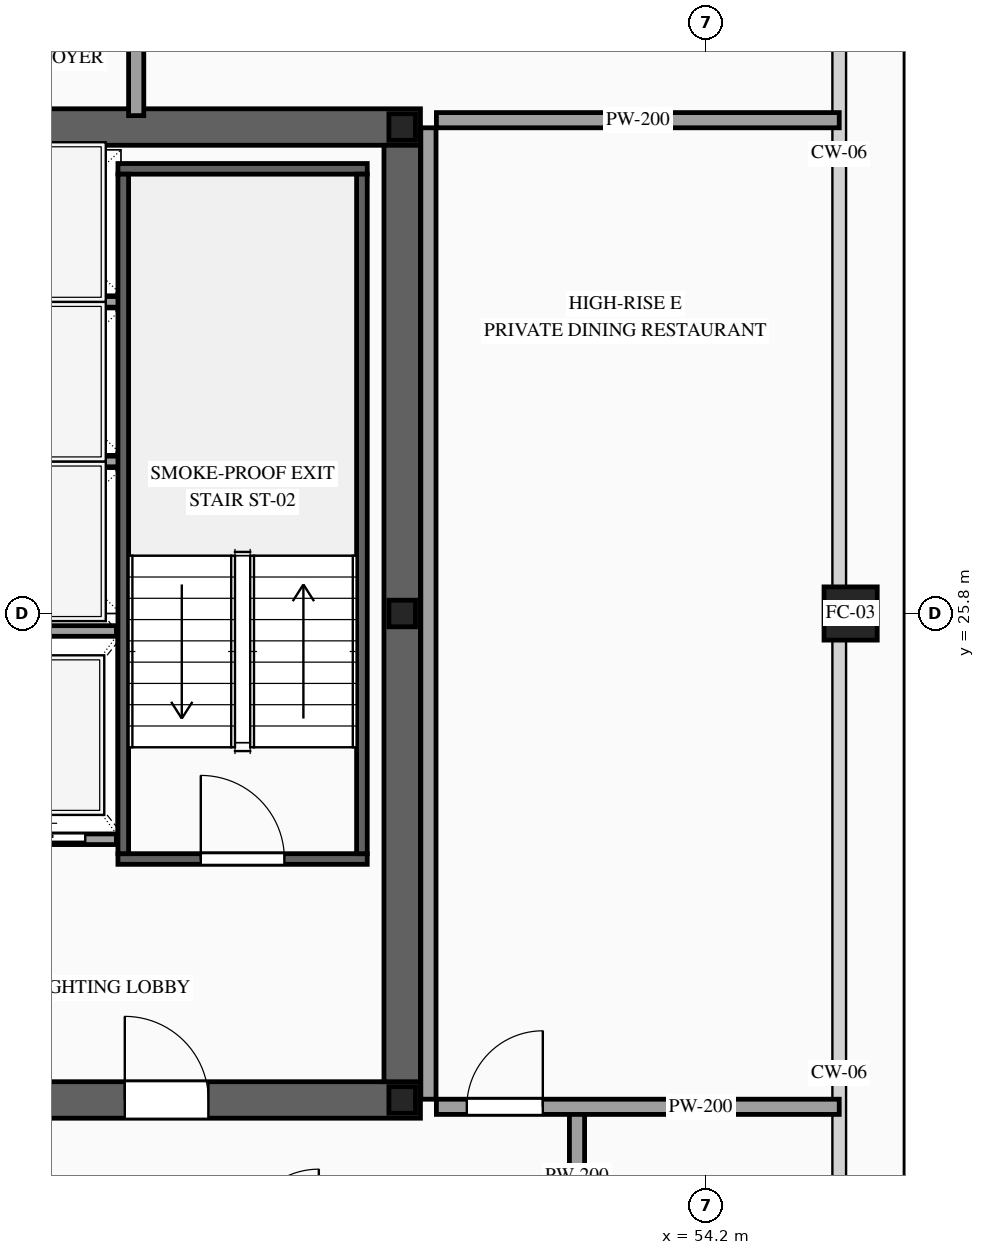
"""IFC4 building model, lengths in metres.
Left out: names, types, materials, properties, quantities, classifications, styles, units other than length and angle.
Written with IfcOpenShell. Run it as: python <this file> out.ifc"""

import sys

from ifc_helpers import new_model, si_unit, direction, frame, frame_2d, origin, origin_2d, place, context, subcontext, project, spatial, rectangle, hollow_rectangle, i_section, extrude, source, transform, mapped, element, fill, save


model = new_model("IFC4")
c1 = context("Model", 3, precision=1e-05, world=origin(), true_north=direction((0.0, 1.0)))
c2 = subcontext(c1, "Body", "Model", "MODEL_VIEW")
j1 = project(units=[si_unit("LENGTHUNIT", "METRE"), si_unit("PLANEANGLEUNIT", "RADIAN")], contexts=[c1])
p1 = place(None, origin())
s1 = spatial("IfcSite", under=j1, at=p1, CompositionType="ELEMENT")
p2 = place(p1, origin())
s2 = spatial("IfcBuilding", under=s1, at=p2, CompositionType="ELEMENT")
p3 = place(p2, frame((0.0, 0.0, 332.2)))
s3 = spatial("IfcBuildingStorey", under=s2, at=p3, CompositionType="ELEMENT", Elevation=332.2)
p4 = place(p3, frame((23.56, 19.4, 0.0), z_axis=(0.0, 0.0, 1.0), x_axis=(1.0, 0.0, 0.0)))
e1 = element("IfcWall", 1, at=p4, inside=s3, PredefinedType="SHEAR", context=c2, shape_type="SweptSolid", body=[
    extrude(rectangle(XDim=26.88, YDim=0.48, at=frame_2d((13.44, 0.0))), origin(), (0.0, 0.0, 1.0), 3.5),
])
p5 = place(p4, frame((1.89, 0.0, 0.0)))
e2 = element("IfcOpeningElement", 2, at=p5, cuts=e1, PredefinedType="OPENING", context=c2, shape_type="SweptSolid", body=[
    extrude(rectangle(XDim=1.1, YDim=2.2, at=frame_2d((0.55, 1.1))), frame((0.0, 0.255, 0.0), z_axis=(0.0, -1.0, 0.0), x_axis=(1.0, 0.0, 0.0)), (0.0, 0.0, 1.0), 0.51),
])
p6 = place(p4, frame((9.79, 0.0, 0.0)))
e3 = element("IfcOpeningElement", 3, at=p6, cuts=e1, PredefinedType="OPENING", context=c2, shape_type="SweptSolid", body=[
    extrude(rectangle(XDim=1.1, YDim=2.2, at=frame_2d((0.55, 1.1))), frame((0.0, 0.255, 0.0), z_axis=(0.0, -1.0, 0.0), x_axis=(1.0, 0.0, 0.0)), (0.0, 0.0, 1.0), 0.51),
])
p7 = place(p4, frame((22.99, 0.0, 0.0)))
e4 = element("IfcOpeningElement", 4, at=p7, cuts=e1, PredefinedType="OPENING", context=c2, shape_type="SweptSolid", body=[
    extrude(rectangle(XDim=1.1, YDim=2.2, at=frame_2d((0.55, 1.1))), frame((0.0, 0.255, 0.0), z_axis=(0.0, -1.0, 0.0), x_axis=(1.0, 0.0, 0.0)), (0.0, 0.0, 1.0), 0.51),
])
p8 = place(p4, frame((19.61, 0.0, 0.0)))
e5 = element("IfcOpeningElement", 5, at=p8, cuts=e1, PredefinedType="OPENING", context=c2, shape_type="SweptSolid", body=[
    extrude(rectangle(XDim=0.9, YDim=2.15, at=frame_2d((0.45, 1.075))), frame((0.0, 0.255, 0.0), z_axis=(0.0, -1.0, 0.0), x_axis=(1.0, 0.0, 0.0)), (0.0, 0.0, 1.0), 0.51),
])
p9 = place(p4, frame((18.17, 0.0, 0.0)))
e6 = element("IfcOpeningElement", 6, at=p9, cuts=e1, PredefinedType="OPENING", context=c2, shape_type="SweptSolid", body=[
    extrude(rectangle(XDim=0.9, YDim=2.15, at=frame_2d((0.45, 1.075))), frame((0.0, 0.255, 0.0), z_axis=(0.0, -1.0, 0.0), x_axis=(1.0, 0.0, 0.0)), (0.0, 0.0, 1.0), 0.51),
])
p10 = place(p3, frame((23.56, 32.2, 0.0), z_axis=(0.0, 0.0, 1.0), x_axis=(1.0, 0.0, 0.0)))
e7 = element("IfcWall", 7, at=p10, inside=s3, PredefinedType="SHEAR", context=c2, shape_type="SweptSolid", body=[
    extrude(rectangle(XDim=26.88, YDim=0.48, at=frame_2d((13.44, 0.0))), origin(), (0.0, 0.0, 1.0), 3.5),
])
p11 = place(p10, frame((4.51, 0.0, 0.0)))
e8 = element("IfcOpeningElement", 8, at=p11, cuts=e7, PredefinedType="OPENING", context=c2, shape_type="SweptSolid", body=[
    extrude(rectangle(XDim=0.9, YDim=2.15, at=frame_2d((0.45, 1.075))), frame((0.0, 0.255, 0.0), z_axis=(0.0, -1.0, 0.0), x_axis=(1.0, 0.0, 0.0)), (0.0, 0.0, 1.0), 0.51),
])
p12 = place(p10, frame((9.79, 0.0, 0.0)))
e9 = element("IfcOpeningElement", 9, at=p12, cuts=e7, PredefinedType="OPENING", context=c2, shape_type="SweptSolid", body=[
    extrude(rectangle(XDim=1.1, YDim=2.2, at=frame_2d((0.55, 1.1))), frame((0.0, 0.255, 0.0), z_axis=(0.0, -1.0, 0.0), x_axis=(1.0, 0.0, 0.0)), (0.0, 0.0, 1.0), 0.51),
])
p13 = place(p10, frame((15.64, 0.0, 0.0)))
e10 = element("IfcOpeningElement", 10, at=p13, cuts=e7, PredefinedType="OPENING", context=c2, shape_type="SweptSolid", body=[
    extrude(rectangle(XDim=1.1, YDim=2.2, at=frame_2d((0.55, 1.1))), frame((0.0, 0.255, 0.0), z_axis=(0.0, -1.0, 0.0), x_axis=(1.0, 0.0, 0.0)), (0.0, 0.0, 1.0), 0.51),
])
p14 = place(p10, frame((18.74, 0.0, 0.0)))
e11 = element("IfcOpeningElement", 11, at=p14, cuts=e7, PredefinedType="OPENING", context=c2, shape_type="SweptSolid", body=[
    extrude(rectangle(XDim=1.1, YDim=2.2, at=frame_2d((0.55, 1.1))), frame((0.0, 0.255, 0.0), z_axis=(0.0, -1.0, 0.0), x_axis=(1.0, 0.0, 0.0)), (0.0, 0.0, 1.0), 0.51),
])
m1 = source(origin(), c2, "Body", "SweptSolid", [
    extrude(rectangle(XDim=12.32, YDim=0.48, at=frame_2d((6.16, 0.0))), origin(), (0.0, 0.0, 1.0), 3.5),
])
p15 = place(p3, frame((50.2, 19.64, 0.0), z_axis=(0.0, 0.0, 1.0), x_axis=(0.0, 1.0, 0.0)))
e12 = element("IfcWall", 12, at=p15, inside=s3, PredefinedType="SHEAR", context=c2, shape_type="MappedRepresentation", body=[
    mapped(m1, transform((0.0, 0.0, 0.0), scale=1.0)),
])
m2 = source(origin(), c2, "Body", "SweptSolid", [
    extrude(i_section(OverallWidth=0.35, OverallDepth=0.35, WebThickness=0.012, FlangeThickness=0.019, at=origin_2d()), origin(), (0.0, 0.0, 1.0), 3.5),
])
for number, where, z_axis, x_axis in (
    (13, (50.2, 19.4, 0.0), (0.0, 0.0, 1.0), (1.0, 0.0, 0.0)),
    (14, (50.2, 25.8, 0.0), (0.0, 0.0, 1.0), (1.0, 0.0, 0.0)),
    (15, (50.2, 32.2, 0.0), (0.0, 0.0, 1.0), (1.0, 0.0, 0.0)),
):
    element("IfcColumn", number, at=place(p3, frame(where, z_axis=z_axis, x_axis=x_axis)), inside=s3, PredefinedType="COLUMN", context=c2, shape_type="MappedRepresentation", body=[
        mapped(m2, transform((0.0, 0.0, 0.0), scale=1.0)),
    ])
m3 = source(origin(), c2, "Body", "SweptSolid", [
    extrude(hollow_rectangle(XDim=0.7, YDim=0.7, WallThickness=0.032, at=origin_2d()), origin(), (0.0, 0.0, 1.0), 3.5),
])
p16 = place(p3, frame((56.1, 25.8, 0.0), z_axis=(0.0, 0.0, 1.0), x_axis=(1.0, 0.0, 0.0)))
e16 = element("IfcColumn", 16, at=p16, inside=s3, PredefinedType="COLUMN", context=c2, shape_type="MappedRepresentation", body=[
    mapped(m3, transform((0.0, 0.0, 0.0), scale=1.0)),
])
p17 = place(p3, frame((44.52, 22.83, 0.0), z_axis=(0.0, 0.0, 1.0), x_axis=(1.0, 0.0, 0.0)))
e17 = element("IfcWall", 17, at=p17, inside=s3, PredefinedType="SOLIDWALL", context=c2, shape_type="SweptSolid", body=[
    extrude(rectangle(XDim=1.92, YDim=0.14, at=frame_2d((0.96, 0.0))), origin(), (0.0, 0.0, 1.0), 3.28),
])
p18 = place(p17, frame((0.41, 0.0, 0.0)))
e18 = element("IfcOpeningElement", 18, at=p18, cuts=e17, PredefinedType="OPENING", context=c2, shape_type="SweptSolid", body=[
    extrude(rectangle(XDim=1.1, YDim=2.2, at=frame_2d((0.55, 1.1))), frame((0.0, 0.085, 0.0), z_axis=(0.0, -1.0, 0.0), x_axis=(1.0, 0.0, 0.0)), (0.0, 0.0, 1.0), 0.17),
])
m4 = source(origin(), c2, "Body", "SweptSolid", [
    extrude(rectangle(XDim=1.92, YDim=0.14, at=frame_2d((0.96, 0.0))), origin(), (0.0, 0.0, 1.0), 3.28),
])
p19 = place(p3, frame((44.52, 25.57, 0.0), z_axis=(0.0, 0.0, 1.0), x_axis=(1.0, 0.0, 0.0)))
e19 = element("IfcWall", 19, at=p19, inside=s3, PredefinedType="SOLIDWALL", context=c2, shape_type="MappedRepresentation", body=[
    mapped(m4, transform((0.0, 0.0, 0.0), scale=1.0)),
])
m5 = source(origin(), c2, "Body", "SweptSolid", [
    extrude(rectangle(XDim=2.0, YDim=0.14, at=frame_2d((1.0, 0.0))), origin(), (0.0, 0.0, 1.0), 3.28),
])
for number, where, z_axis, x_axis in (
    (20, (44.5, 27.8, 0.0), (0.0, 0.0, 1.0), (1.0, 0.0, 0.0)),
    (21, (44.5, 29.9, 0.0), (0.0, 0.0, 1.0), (1.0, 0.0, 0.0)),
):
    element("IfcWall", number, at=place(p3, frame(where, z_axis=z_axis, x_axis=x_axis)), inside=s3, PredefinedType="SOLIDWALL", context=c2, shape_type="MappedRepresentation", body=[
        mapped(m5, transform((0.0, 0.0, 0.0), scale=1.0)),
    ])
p20 = place(p3, frame((46.46, 22.57, 0.0), z_axis=(0.0, 0.0, 1.0), x_axis=(1.0, 0.0, 0.0)))
e22 = element("IfcWall", 22, at=p20, inside=s3, PredefinedType="SOLIDWALL", context=c2, shape_type="SweptSolid", body=[
    extrude(rectangle(XDim=3.28, YDim=0.14, at=frame_2d((1.64, 0.0))), origin(), (0.0, 0.0, 1.0), 3.28),
])
p21 = place(p20, frame((1.09, 0.0, 0.0)))
e23 = element("IfcOpeningElement", 23, at=p21, cuts=e22, PredefinedType="OPENING", context=c2, shape_type="SweptSolid", body=[
    extrude(rectangle(XDim=1.1, YDim=2.2, at=frame_2d((0.55, 1.1))), frame((0.0, 0.085, 0.0), z_axis=(0.0, -1.0, 0.0), x_axis=(1.0, 0.0, 0.0)), (0.0, 0.0, 1.0), 0.17),
])
m6 = source(origin(), c2, "Body", "SweptSolid", [
    extrude(rectangle(XDim=3.28, YDim=0.14, at=frame_2d((1.64, 0.0))), origin(), (0.0, 0.0, 1.0), 3.28),
])
p22 = place(p3, frame((46.46, 31.65, 0.0), z_axis=(0.0, 0.0, 1.0), x_axis=(1.0, 0.0, 0.0)))
e24 = element("IfcWall", 24, at=p22, inside=s3, PredefinedType="SOLIDWALL", context=c2, shape_type="MappedRepresentation", body=[
    mapped(m6, transform((0.0, 0.0, 0.0), scale=1.0)),
])
m7 = source(origin(), c2, "Body", "SweptSolid", [
    extrude(rectangle(XDim=8.94, YDim=0.14, at=frame_2d((4.47, 0.0))), origin(), (0.0, 0.0, 1.0), 3.28),
])
for number, where, z_axis, x_axis in (
    (25, (46.53, 22.64, 0.0), (0.0, 0.0, 1.0), (0.0, 1.0, 0.0)),
    (26, (49.67, 22.64, 0.0), (0.0, 0.0, 1.0), (0.0, 1.0, 0.0)),
):
    element("IfcWall", number, at=place(p3, frame(where, z_axis=z_axis, x_axis=x_axis)), inside=s3, PredefinedType="SOLIDWALL", context=c2, shape_type="MappedRepresentation", body=[
        mapped(m7, transform((0.0, 0.0, 0.0), scale=1.0)),
    ])
m8 = source(origin(), c2, "Body", "SweptSolid", [
    extrude(rectangle(XDim=1.7, YDim=0.2, at=frame_2d((0.85, 0.0))), origin(), (0.0, 0.0, 1.0), 3.28),
])
for number, where, z_axis, x_axis in (
    (27, (46.7, 32.35, 0.0), (0.0, 0.0, 1.0), (0.0, 1.0, 0.0)),
    (28, (52.5, 17.55, 0.0), (0.0, 0.0, 1.0), (0.0, 1.0, 0.0)),
):
    element("IfcWall", number, at=place(p3, frame(where, z_axis=z_axis, x_axis=x_axis)), inside=s3, PredefinedType="PARTITIONING", context=c2, shape_type="MappedRepresentation", body=[
        mapped(m8, transform((0.0, 0.0, 0.0), scale=1.0)),
    ])
p23 = place(p3, frame((50.65, 19.31, 0.0), z_axis=(0.0, 0.0, 1.0), x_axis=(1.0, 0.0, 0.0)))
e29 = element("IfcWall", 29, at=p23, inside=s3, PredefinedType="PARTITIONING", context=c2, shape_type="SweptSolid", body=[
    extrude(rectangle(XDim=5.3, YDim=0.2, at=frame_2d((2.65, 0.0))), origin(), (0.0, 0.0, 1.0), 2.825),
])
p24 = place(p23, frame((0.4, 0.0, 0.0)))
e30 = element("IfcOpeningElement", 30, at=p24, cuts=e29, PredefinedType="OPENING", context=c2, shape_type="SweptSolid", body=[
    extrude(rectangle(XDim=1.0, YDim=2.2, at=frame_2d((0.5, 1.1))), frame((0.0, 0.115, 0.0), z_axis=(0.0, -1.0, 0.0), x_axis=(1.0, 0.0, 0.0)), (0.0, 0.0, 1.0), 0.23),
])
m9 = source(origin(), c2, "Body", "SweptSolid", [
    extrude(rectangle(XDim=5.3, YDim=0.2, at=frame_2d((2.65, 0.0))), origin(), (0.0, 0.0, 1.0), 2.825),
])
p25 = place(p3, frame((50.65, 32.29, 0.0), z_axis=(0.0, 0.0, 1.0), x_axis=(1.0, 0.0, 0.0)))
e31 = element("IfcWall", 31, at=p25, inside=s3, PredefinedType="PARTITIONING", context=c2, shape_type="MappedRepresentation", body=[
    mapped(m9, transform((0.0, 0.0, 0.0), scale=1.0)),
])
m10 = source(origin(), c2, "Body", "SweptSolid", [
    extrude(rectangle(XDim=12.78, YDim=0.2, at=frame_2d((6.39, 0.0))), origin(), (0.0, 0.0, 1.0), 3.28),
])
p26 = place(p3, frame((50.545, 19.41, 0.0), z_axis=(0.0, 0.0, 1.0), x_axis=(0.0, 1.0, 0.0)))
e32 = element("IfcWall", 32, at=p26, inside=s3, PredefinedType="PARTITIONING", context=c2, shape_type="MappedRepresentation", body=[
    mapped(m10, transform((0.0, 0.0, 0.0), scale=1.0)),
])
m11 = source(origin(), c2, "Body", "SweptSolid", [
    extrude(rectangle(XDim=1.1, YDim=2.2, at=frame_2d((0.55, 1.1))), frame((0.0, 0.025, 0.0), z_axis=(0.0, -1.0, 0.0), x_axis=(1.0, 0.0, 0.0)), (0.0, 0.0, 1.0), 0.05),
])
p27 = place(p18, origin())
e33 = element("IfcDoor", 33, at=p27, inside=s3, OperationType="SLIDING_TO_RIGHT", PredefinedType="DOOR", context=c2, shape_type="MappedRepresentation", body=[
    mapped(m11, transform((0.0, 0.0, 0.0), scale=1.0)),
])
fill(e18, e33)
m12 = source(origin(), c2, "Body", "SweptSolid", [
    extrude(rectangle(XDim=1.1, YDim=2.2, at=frame_2d((0.55, 1.1))), frame((0.0, 0.025, 0.0), z_axis=(0.0, -1.0, 0.0), x_axis=(1.0, 0.0, 0.0)), (0.0, 0.0, 1.0), 0.05),
])
p28 = place(p21, origin())
e34 = element("IfcDoor", 34, at=p28, inside=s3, OperationType="SINGLE_SWING_LEFT", PredefinedType="DOOR", context=c2, shape_type="MappedRepresentation", body=[
    mapped(m12, transform((0.0, 0.0, 0.0), scale=1.0)),
])
fill(e23, e34)
p29 = place(p7, origin())
e35 = element("IfcDoor", 35, at=p29, inside=s3, OperationType="SINGLE_SWING_LEFT", PredefinedType="DOOR", context=c2, shape_type="MappedRepresentation", body=[
    mapped(m12, transform((0.0, 0.0, 0.0), scale=1.0)),
])
fill(e4, e35)
m13 = source(origin(), c2, "Body", "SweptSolid", [
    extrude(rectangle(XDim=1.0, YDim=2.2, at=frame_2d((0.5, 1.1))), frame((0.0, 0.025, 0.0), z_axis=(0.0, -1.0, 0.0), x_axis=(1.0, 0.0, 0.0)), (0.0, 0.0, 1.0), 0.05),
])
p30 = place(p24, origin())
e36 = element("IfcDoor", 36, at=p30, inside=s3, OperationType="SINGLE_SWING_RIGHT", PredefinedType="DOOR", context=c2, shape_type="MappedRepresentation", body=[
    mapped(m13, transform((0.0, 0.0, 0.0), scale=1.0)),
])
fill(e30, e36)
save(model, sys.argv[1])
